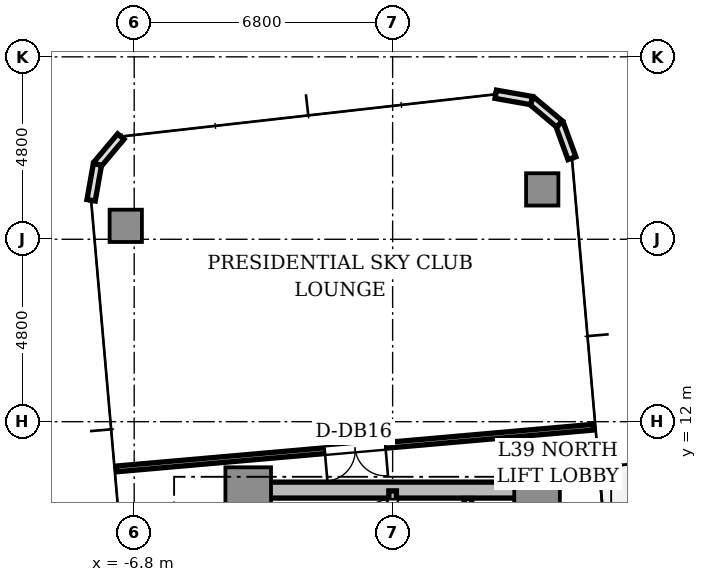
"""IFC4 building model, lengths in metres.
Left out: names, types, materials, properties, quantities, classifications, styles, units other than length and angle.
Written with IfcOpenShell. Run it as: python <this file> out.ifc"""

import sys

from ifc_helpers import new_model, si_unit, direction, frame, frame_2d, origin, origin_2d, place, context, subcontext, project, spatial, rectangle, extrude, source, transform, mapped, element, fill, save


model = new_model("IFC4")
c1 = context("Model", 3, precision=1e-05, world=origin(), true_north=direction((0.0, 1.0)))
c2 = subcontext(c1, "Body", "Model", "MODEL_VIEW")
j1 = project(units=[si_unit("LENGTHUNIT", "METRE"), si_unit("PLANEANGLEUNIT", "RADIAN")], contexts=[c1])
p1 = place(None, origin())
s1 = spatial("IfcSite", under=j1, at=p1, CompositionType="ELEMENT")
p2 = place(p1, origin())
s2 = spatial("IfcBuilding", under=s1, at=p2, CompositionType="ELEMENT")
p3 = place(p2, frame((0.0, 0.0, 142.75)))
s3 = spatial("IfcBuildingStorey", under=s2, at=p3, CompositionType="ELEMENT", Elevation=142.75)
p4 = place(p3, frame((-3.55, 10.2, 0.0), z_axis=(0.0, 0.0, 1.0), x_axis=(1.0, 0.0, 0.0)))
e1 = element("IfcWall", 1, at=p4, inside=s3, PredefinedType="SHEAR", context=c2, shape_type="SweptSolid", body=[
    extrude(rectangle(XDim=7.1, YDim=0.42, at=frame_2d((3.55, 0.0))), origin(), (0.0, 0.0, 1.0), 4.26),
])
m1 = source(origin(), c2, "Body", "SweptSolid", [
    extrude(rectangle(XDim=1.2, YDim=1.2, at=origin_2d()), origin(), (0.0, 0.0, 1.0), 4.26),
])
for number, where, z_axis, x_axis in (
    (2, (-3.8, 10.2, 0.0), (0.0, 0.0, 1.0), (1.0, 0.0, 0.0)),
    (3, (3.8, 10.2, 0.0), (0.0, 0.0, 1.0), (1.0, 0.0, 0.0)),
):
    element("IfcColumn", number, at=place(p3, frame(where, z_axis=z_axis, x_axis=x_axis)), inside=s3, PredefinedType="COLUMN", context=c2, shape_type="MappedRepresentation", body=[
        mapped(m1, transform((0.0, 0.0, 0.0), scale=1.0)),
    ])
m2 = source(origin(), c2, "Body", "SweptSolid", [
    extrude(rectangle(XDim=0.85, YDim=0.85, at=origin_2d()), origin(), (0.0, 0.0, 1.0), 4.26),
])
for number, where, z_axis, x_axis in (
    (4, (3.936, 18.112, 0.0), (0.0, 0.0, 1.0), (1.0, 0.0, 0.0)),
    (5, (-7.022, 17.153, 0.0), (0.0, 0.0, 1.0), (1.0, 0.0, 0.0)),
):
    element("IfcColumn", number, at=place(p3, frame(where, z_axis=z_axis, x_axis=x_axis)), inside=s3, PredefinedType="COLUMN", context=c2, shape_type="MappedRepresentation", body=[
        mapped(m2, transform((0.0, 0.0, 0.0), scale=1.0)),
    ])
p5 = place(p3, frame((4.718, 18.933, 0.0), z_axis=(0.0, 0.0, 1.0), x_axis=(-0.34188635151, 0.939741306239, 0.0)))
e6 = element("IfcWall", 6, at=p5, inside=s3, PredefinedType="STANDARD", context=c2, shape_type="SweptSolid", body=[
    extrude(rectangle(XDim=0.958, YDim=0.22, at=frame_2d((0.479, 0.0))), origin(), (0.0, 0.0, 1.0), 4.26),
])
for number, where, z_axis, x_axis in (
    (7, (4.39, 19.833, 0.0), (0.0, 0.0, 1.0), (-0.766, 0.643, 0.0)),
    (8, (3.657, 20.449, 0.0), (0.0, 0.0, 1.0), (-0.985, 0.174, 0.0)),
):
    element("IfcWall", number, at=place(p3, frame(where, z_axis=z_axis, x_axis=x_axis)), inside=s3, PredefinedType="STANDARD", context=c2, shape_type="SweptSolid", body=[
        extrude(rectangle(XDim=0.958, YDim=0.22, at=frame_2d((0.479, 0.0))), origin(), (0.0, 0.0, 1.0), 4.26),
    ])
for number, where, z_axis, x_axis in (
    (9, (-7.152, 19.503, 0.0), (0.0, 0.0, 1.0), (-0.643, -0.766, 0.0)),
    (10, (-7.768, 18.769, 0.0), (0.0, 0.0, 1.0), (-0.174, -0.985, 0.0)),
):
    element("IfcWall", number, at=place(p3, frame(where, z_axis=z_axis, x_axis=x_axis)), inside=s3, PredefinedType="STANDARD", context=c2, shape_type="SweptSolid", body=[
        extrude(rectangle(XDim=0.958, YDim=0.22, at=frame_2d((0.479, 0.0))), origin(), (0.0, 0.0, 1.0), 4.26),
    ])
p6 = place(p3, frame((0.0, 2.5, 0.0), z_axis=(0.0, 0.0, 1.0), x_axis=(0.0, 1.0, 0.0)))
e11 = element("IfcWall", 11, at=p6, inside=s3, PredefinedType="SOLIDWALL", context=c2, shape_type="SweptSolid", body=[
    extrude(rectangle(XDim=7.68, YDim=0.2, at=frame_2d((3.84, 0.0))), origin(), (0.0, 0.0, 1.0), 4.26),
])
p7 = place(p6, frame((6.36, 0.0, 0.0)))
e12 = element("IfcOpeningElement", 12, at=p7, cuts=e11, PredefinedType="OPENING", context=c2, shape_type="SweptSolid", body=[
    extrude(rectangle(XDim=1.1, YDim=2.15, at=frame_2d((0.55, 1.075))), frame((0.0, 0.11, 0.0), z_axis=(0.0, -1.0, 0.0), x_axis=(1.0, 0.0, 0.0)), (0.0, 0.0, 1.0), 0.22),
])
p8 = place(p3, frame((1.98, 5.32, 0.0), z_axis=(0.0, 0.0, 1.0), x_axis=(0.0, 1.0, 0.0)))
e13 = element("IfcWall", 13, at=p8, inside=s3, PredefinedType="SOLIDWALL", context=c2, shape_type="SweptSolid", body=[
    extrude(rectangle(XDim=4.66, YDim=0.2, at=frame_2d((2.33, 0.0))), origin(), (0.0, 0.0, 1.0), 3.81),
])
p9 = place(p8, frame((3.04, 0.0, 0.0)))
e14 = element("IfcOpeningElement", 14, at=p9, cuts=e13, PredefinedType="OPENING", context=c2, shape_type="SweptSolid", body=[
    extrude(rectangle(XDim=0.85, YDim=2.1, at=frame_2d((0.425, 1.05))), frame((0.0, 0.11, 0.0), z_axis=(0.0, -1.0, 0.0), x_axis=(1.0, 0.0, 0.0)), (0.0, 0.0, 1.0), 0.22),
])
p10 = place(p3, frame((5.287, 11.856, 0.0), z_axis=(0.0, 0.0, 1.0), x_axis=(-0.996194790044, -0.087154691724, 0.0)))
e15 = element("IfcWall", 15, at=p10, inside=s3, PredefinedType="PARTITIONING", context=c2, shape_type="SweptSolid", body=[
    extrude(rectangle(XDim=12.6, YDim=0.15, at=frame_2d((6.3, 0.0))), origin(), (0.0, 0.0, 1.0), 3.81),
])
p11 = place(p10, frame((5.5, 0.0, 0.0)))
e16 = element("IfcOpeningElement", 16, at=p11, cuts=e15, PredefinedType="OPENING", context=c2, shape_type="SweptSolid", body=[
    extrude(rectangle(XDim=1.6, YDim=2.25, at=frame_2d((0.8, 1.125))), frame((0.0, 0.085, 0.0), z_axis=(0.0, -1.0, 0.0), x_axis=(1.0, 0.0, 0.0)), (0.0, 0.0, 1.0), 0.17),
])
m3 = source(origin(), c2, "Body", "SweptSolid", [
    extrude(rectangle(XDim=1.1, YDim=0.05, at=origin_2d()), origin(), (0.0, 0.0, 1.0), 2.15),
])
p12 = place(p7, frame((0.55, 0.0, 0.0)))
e17 = element("IfcDoor", 17, at=p12, inside=s3, OperationType="SINGLE_SWING_LEFT", PredefinedType="DOOR", context=c2, shape_type="MappedRepresentation", body=[
    mapped(m3, transform((0.0, 0.0, 0.0), scale=1.0)),
])
fill(e12, e17)
m4 = source(origin(), c2, "Body", "SweptSolid", [
    extrude(rectangle(XDim=1.6, YDim=0.05, at=origin_2d()), origin(), (0.0, 0.0, 1.0), 2.25),
])
p13 = place(p11, frame((0.8, 0.0, 0.0)))
e18 = element("IfcDoor", 18, at=p13, inside=s3, OperationType="DOUBLE_DOOR_SINGLE_SWING", PredefinedType="DOOR", context=c2, shape_type="MappedRepresentation", body=[
    mapped(m4, transform((0.0, 0.0, 0.0), scale=1.0)),
])
fill(e16, e18)
save(model, sys.argv[1])
